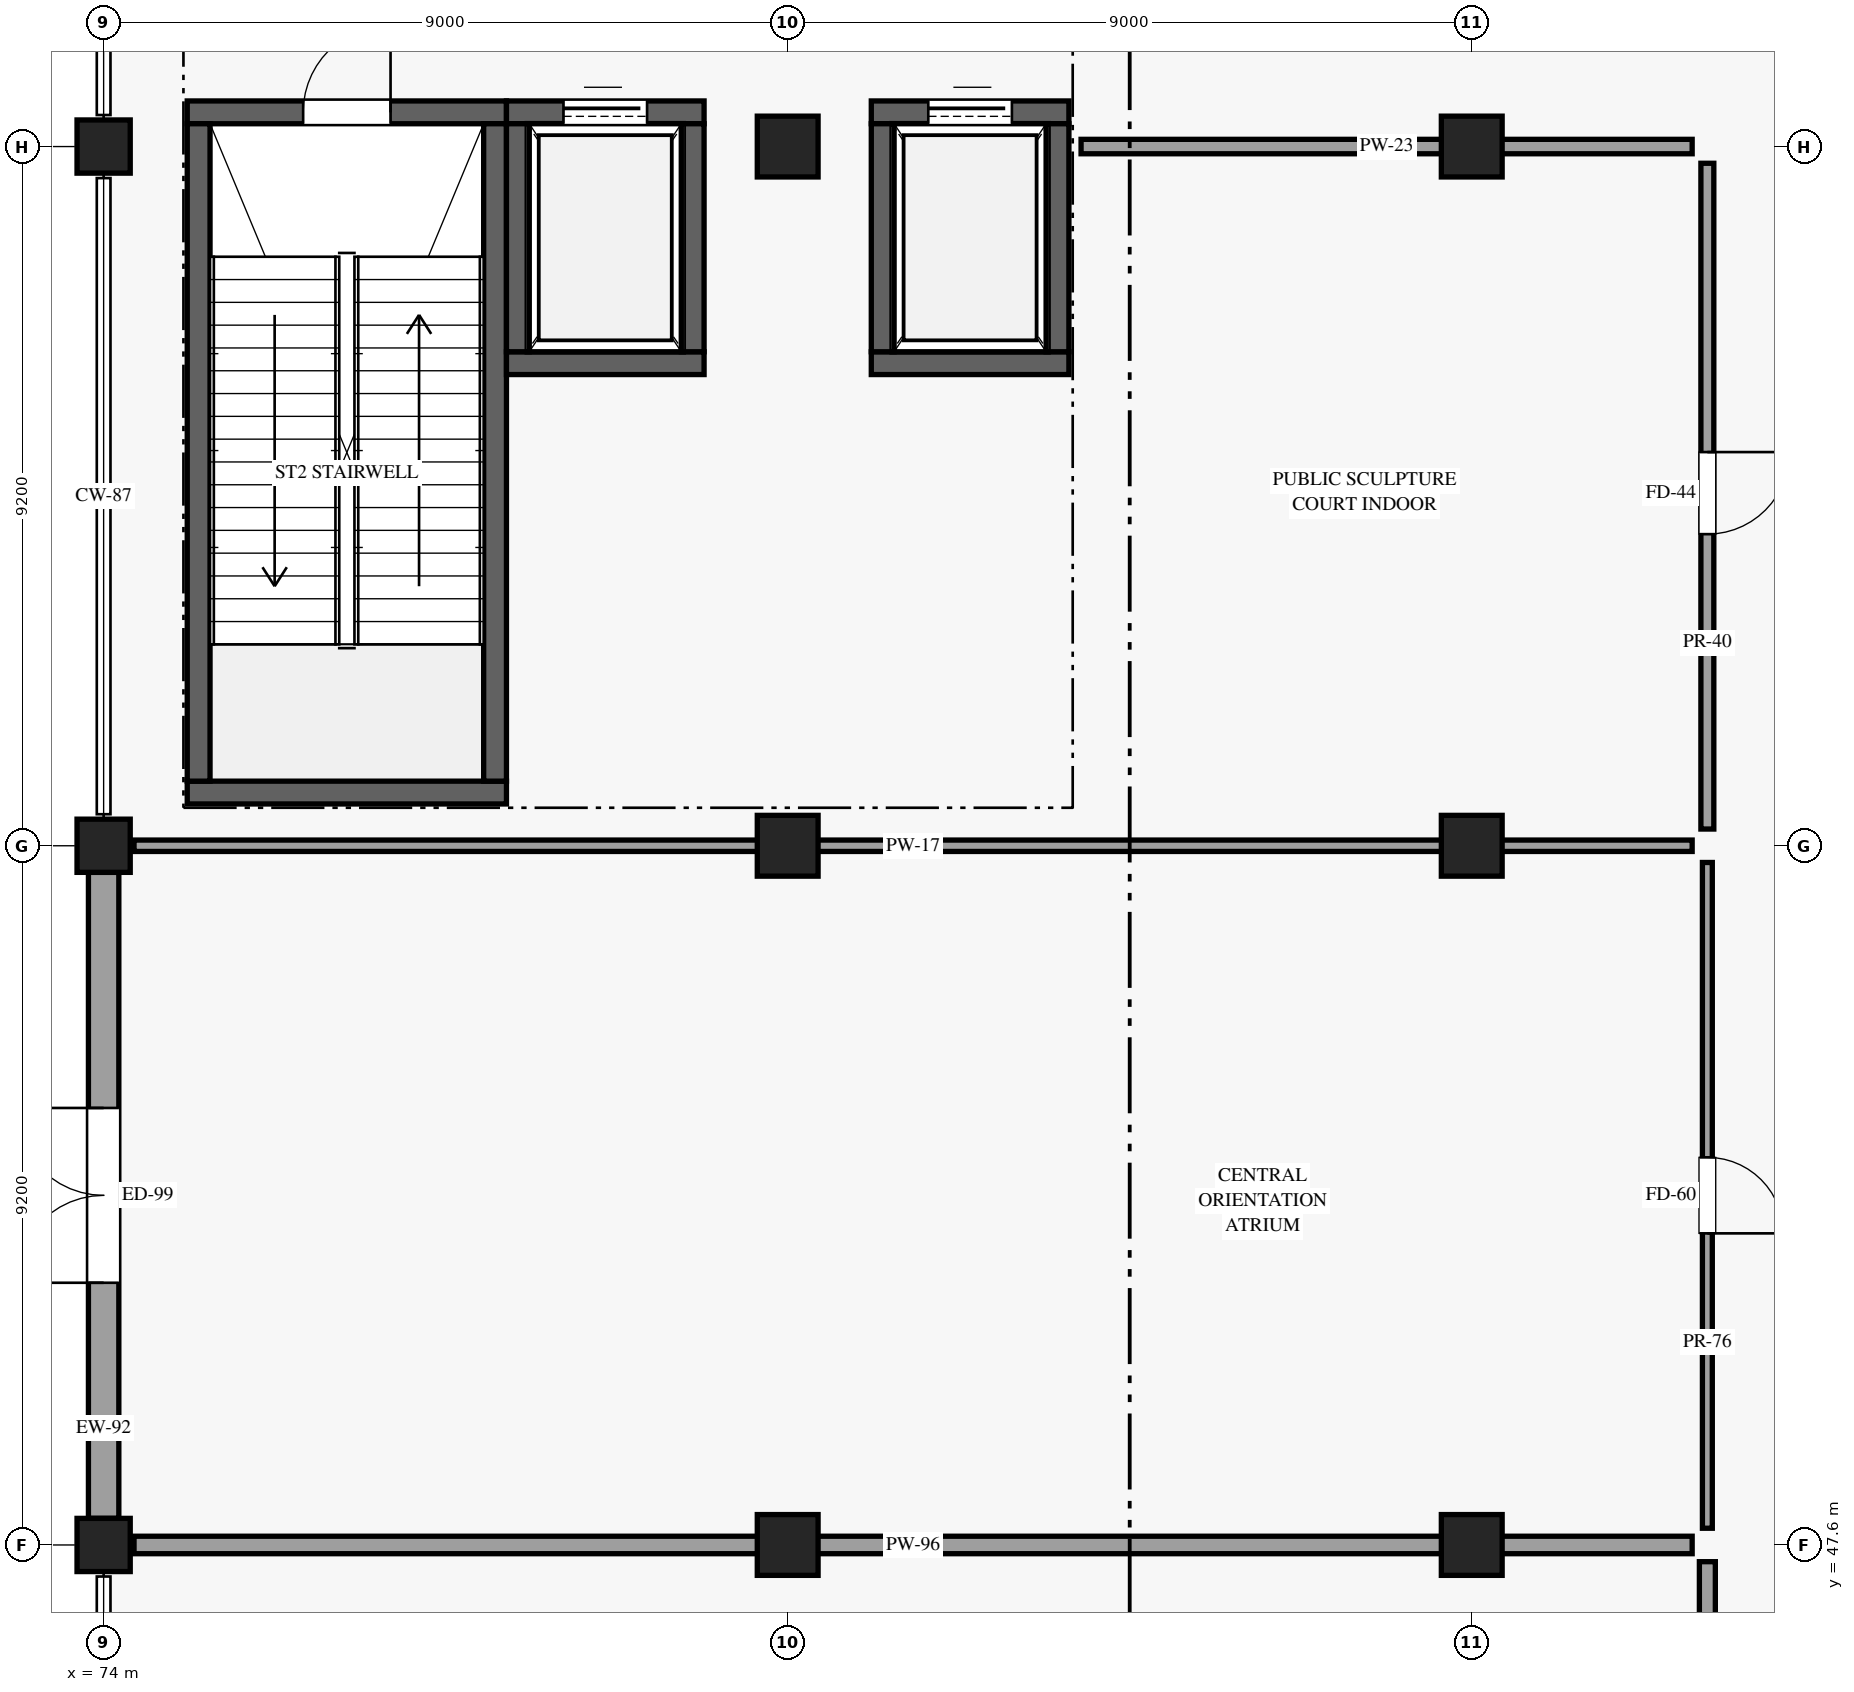
"""IFC4 building model, lengths in metres.
Left out: names, types, materials, properties, quantities, classifications, styles, units other than length and angle.
Written with IfcOpenShell. Run it as: python <this file> out.ifc"""

import sys

from ifc_helpers import new_model, si_unit, direction, frame, frame_2d, origin, origin_2d, place, context, subcontext, project, spatial, rectangle, circle, extrude, element, fill, save


model = new_model("IFC4")
c1 = context("Model", 3, precision=1e-05, world=origin(), true_north=direction((0.0, 1.0)))
c2 = subcontext(c1, "Body", "Model", "MODEL_VIEW")
j1 = project(units=[si_unit("LENGTHUNIT", "METRE"), si_unit("PLANEANGLEUNIT", "RADIAN")], contexts=[c1])
p1 = place(None, origin())
s1 = spatial("IfcSite", under=j1, at=p1, CompositionType="ELEMENT")
p2 = place(p1, origin())
s2 = spatial("IfcBuilding", under=s1, at=p2, CompositionType="ELEMENT")
p3 = place(p2, origin())
s3 = spatial("IfcBuildingStorey", under=s2, at=p3, CompositionType="ELEMENT", Elevation=0.0)
for number, where, z_axis, x_axis in (
    (1, (74.0, 47.6, 0.0), (0.0, 0.0, 1.0), (1.0, 0.0, 0.0)),
    (2, (74.0, 56.8, 0.0), (0.0, 0.0, 1.0), (1.0, 0.0, 0.0)),
    (3, (74.0, 66.0, 0.0), (0.0, 0.0, 1.0), (1.0, 0.0, 0.0)),
):
    element("IfcColumn", number, at=place(p3, frame(where, z_axis=z_axis, x_axis=x_axis)), inside=s3, PredefinedType="COLUMN", context=c2, shape_type="SweptSolid", body=[
        extrude(rectangle(XDim=0.7, YDim=0.7, at=origin_2d()), origin(), (0.0, 0.0, 1.0), 5.4),
    ])
for number, where, z_axis, x_axis in (
    (4, (83.0, 47.6, 0.0), (0.0, 0.0, 1.0), (1.0, 0.0, 0.0)),
    (5, (83.0, 56.8, 0.0), (0.0, 0.0, 1.0), (1.0, 0.0, 0.0)),
    (6, (83.0, 66.0, 0.0), (0.0, 0.0, 1.0), (1.0, 0.0, 0.0)),
    (7, (92.0, 47.6, 0.0), (0.0, 0.0, 1.0), (1.0, 0.0, 0.0)),
    (8, (92.0, 56.8, 0.0), (0.0, 0.0, 1.0), (1.0, 0.0, 0.0)),
    (9, (92.0, 66.0, 0.0), (0.0, 0.0, 1.0), (1.0, 0.0, 0.0)),
):
    element("IfcColumn", number, at=place(p3, frame(where, z_axis=z_axis, x_axis=x_axis)), inside=s3, PredefinedType="COLUMN", context=c2, shape_type="SweptSolid", body=[
        extrude(circle(Radius=0.4, at=origin_2d()), origin(), (0.0, 0.0, 1.0), 5.4),
    ])
p4 = place(p3, frame((74.0, 47.95, 0.0), z_axis=(0.0, 0.0, 1.0), x_axis=(0.0, 1.0, 0.0)))
e10 = element("IfcWall", 10, at=p4, inside=s3, PredefinedType="STANDARD", context=c2, shape_type="SweptSolid", body=[
    extrude(rectangle(XDim=8.5, YDim=0.4, at=frame_2d((4.25, 0.0))), origin(), (0.0, 0.0, 1.0), 4.195),
])
p5 = place(p4, frame((3.1, 0.0, 0.0)))
e11 = element("IfcOpeningElement", 11, at=p5, cuts=e10, PredefinedType="OPENING", context=c2, shape_type="SweptSolid", body=[
    extrude(rectangle(XDim=2.3, YDim=2.55, at=frame_2d((1.15, 1.275))), frame((0.0, 0.21, 0.0), z_axis=(0.0, -1.0, 0.0), x_axis=(1.0, 0.0, 0.0)), (0.0, 0.0, 1.0), 0.42),
])
p6 = place(p3, frame((75.1, 66.45, 0.0), z_axis=(0.0, 0.0, 1.0), x_axis=(1.0, 0.0, 0.0)))
e12 = element("IfcWall", 12, at=p6, inside=s3, PredefinedType="SHEAR", context=c2, shape_type="SweptSolid", body=[
    extrude(rectangle(XDim=4.2, YDim=0.3, at=frame_2d((2.1, 0.0))), origin(), (0.0, 0.0, 1.0), 5.12),
])
p7 = place(p6, frame((1.525, 0.0, 0.0)))
e13 = element("IfcOpeningElement", 13, at=p7, cuts=e12, PredefinedType="OPENING", context=c2, shape_type="SweptSolid", body=[
    extrude(rectangle(XDim=1.15, YDim=2.2, at=frame_2d((0.575, 1.1))), frame((0.0, 0.16, 0.0), z_axis=(0.0, -1.0, 0.0), x_axis=(1.0, 0.0, 0.0)), (0.0, 0.0, 1.0), 0.32),
])
p8 = place(p3, frame((75.1, 57.5, 0.0), z_axis=(0.0, 0.0, 1.0), x_axis=(1.0, 0.0, 0.0)))
e14 = element("IfcWall", 14, at=p8, inside=s3, PredefinedType="SHEAR", context=c2, shape_type="SweptSolid", body=[
    extrude(rectangle(XDim=4.2, YDim=0.3, at=frame_2d((2.1, 0.0))), origin(), (0.0, 0.0, 1.0), 5.12),
])
for number, where, z_axis, x_axis in (
    (15, (75.25, 57.65, 0.0), (0.0, 0.0, 1.0), (0.0, 1.0, 0.0)),
    (16, (79.15, 57.65, 0.0), (0.0, 0.0, 1.0), (0.0, 1.0, 0.0)),
):
    element("IfcWall", number, at=place(p3, frame(where, z_axis=z_axis, x_axis=x_axis)), inside=s3, PredefinedType="SHEAR", context=c2, shape_type="SweptSolid", body=[
        extrude(rectangle(XDim=8.65, YDim=0.3, at=frame_2d((4.325, 0.0))), origin(), (0.0, 0.0, 1.0), 5.12),
    ])
p9 = place(p3, frame((79.3, 66.45, 0.0), z_axis=(0.0, 0.0, 1.0), x_axis=(1.0, 0.0, 0.0)))
e17 = element("IfcWall", 17, at=p9, inside=s3, PredefinedType="SHEAR", context=c2, shape_type="SweptSolid", body=[
    extrude(rectangle(XDim=2.6, YDim=0.3, at=frame_2d((1.3, 0.0))), origin(), (0.0, 0.0, 1.0), 5.12),
])
p10 = place(p9, frame((0.75, 0.0, 0.0)))
e18 = element("IfcOpeningElement", 18, at=p10, cuts=e17, PredefinedType="OPENING", context=c2, shape_type="SweptSolid", body=[
    extrude(rectangle(XDim=1.1, YDim=2.2, at=frame_2d((0.55, 1.1))), frame((0.0, 0.16, 0.0), z_axis=(0.0, -1.0, 0.0), x_axis=(1.0, 0.0, 0.0)), (0.0, 0.0, 1.0), 0.32),
])
p11 = place(p3, frame((79.3, 63.15, 0.0), z_axis=(0.0, 0.0, 1.0), x_axis=(1.0, 0.0, 0.0)))
e19 = element("IfcWall", 19, at=p11, inside=s3, PredefinedType="SHEAR", context=c2, shape_type="SweptSolid", body=[
    extrude(rectangle(XDim=2.6, YDim=0.3, at=frame_2d((1.3, 0.0))), origin(), (0.0, 0.0, 1.0), 5.12),
])
for number, where, z_axis, x_axis in (
    (20, (81.75, 63.3, 0.0), (0.0, 0.0, 1.0), (0.0, 1.0, 0.0)),
    (21, (79.45, 63.3, 0.0), (0.0, 0.0, 1.0), (0.0, 1.0, 0.0)),
):
    element("IfcWall", number, at=place(p3, frame(where, z_axis=z_axis, x_axis=x_axis)), inside=s3, PredefinedType="SHEAR", context=c2, shape_type="SweptSolid", body=[
        extrude(rectangle(XDim=3.0, YDim=0.3, at=frame_2d((1.5, 0.0))), origin(), (0.0, 0.0, 1.0), 5.12),
    ])
p12 = place(p3, frame((84.1, 66.45, 0.0), z_axis=(0.0, 0.0, 1.0), x_axis=(1.0, 0.0, 0.0)))
e22 = element("IfcWall", 22, at=p12, inside=s3, PredefinedType="SHEAR", context=c2, shape_type="SweptSolid", body=[
    extrude(rectangle(XDim=2.6, YDim=0.3, at=frame_2d((1.3, 0.0))), origin(), (0.0, 0.0, 1.0), 5.12),
])
p13 = place(p12, frame((0.75, 0.0, 0.0)))
e23 = element("IfcOpeningElement", 23, at=p13, cuts=e22, PredefinedType="OPENING", context=c2, shape_type="SweptSolid", body=[
    extrude(rectangle(XDim=1.1, YDim=2.2, at=frame_2d((0.55, 1.1))), frame((0.0, 0.16, 0.0), z_axis=(0.0, -1.0, 0.0), x_axis=(1.0, 0.0, 0.0)), (0.0, 0.0, 1.0), 0.32),
])
p14 = place(p3, frame((84.1, 63.15, 0.0), z_axis=(0.0, 0.0, 1.0), x_axis=(1.0, 0.0, 0.0)))
e24 = element("IfcWall", 24, at=p14, inside=s3, PredefinedType="SHEAR", context=c2, shape_type="SweptSolid", body=[
    extrude(rectangle(XDim=2.6, YDim=0.3, at=frame_2d((1.3, 0.0))), origin(), (0.0, 0.0, 1.0), 5.12),
])
for number, where, z_axis, x_axis in (
    (25, (86.55, 63.3, 0.0), (0.0, 0.0, 1.0), (0.0, 1.0, 0.0)),
    (26, (84.25, 63.3, 0.0), (0.0, 0.0, 1.0), (0.0, 1.0, 0.0)),
):
    element("IfcWall", number, at=place(p3, frame(where, z_axis=z_axis, x_axis=x_axis)), inside=s3, PredefinedType="SHEAR", context=c2, shape_type="SweptSolid", body=[
        extrude(rectangle(XDim=3.0, YDim=0.3, at=frame_2d((1.5, 0.0))), origin(), (0.0, 0.0, 1.0), 5.12),
    ])
p15 = place(p3, frame((95.1, 38.94, 0.0), z_axis=(0.0, 0.0, 1.0), x_axis=(0.0, 1.0, 0.0)))
e27 = element("IfcWall", 27, at=p15, inside=s3, PredefinedType="PARTITIONING", context=c2, shape_type="SweptSolid", body=[
    extrude(rectangle(XDim=8.44, YDim=0.21, at=frame_2d((4.22, 0.0))), origin(), (0.0, 0.0, 1.0), 4.195),
])
p16 = place(p15, frame((4.828, 0.0, 0.0), z_axis=(0.0, 0.0, 1.0), x_axis=(-1.0, 0.0, 0.0)))
e28 = element("IfcOpeningElement", 28, at=p16, cuts=e27, PredefinedType="OPENING", context=c2, shape_type="SweptSolid", body=[
    extrude(rectangle(XDim=1.46, YDim=2.32, at=frame_2d((0.73, 1.16))), frame((0.0, 0.115, 0.0), z_axis=(0.0, -1.0, 0.0), x_axis=(1.0, 0.0, 0.0)), (0.0, 0.0, 1.0), 0.23),
])
p17 = place(p3, frame((74.4, 47.6, 0.0), z_axis=(0.0, 0.0, 1.0), x_axis=(1.0, 0.0, 0.0)))
e29 = element("IfcWall", 29, at=p17, inside=s3, PredefinedType="PARTITIONING", context=c2, shape_type="SweptSolid", body=[
    extrude(rectangle(XDim=20.5, YDim=0.23, at=frame_2d((10.25, 0.0))), origin(), (0.0, 0.0, 1.0), 4.195),
])
p18 = place(p3, frame((95.1, 47.82, 0.0), z_axis=(0.0, 0.0, 1.0), x_axis=(0.0, 1.0, 0.0)))
e30 = element("IfcWall", 30, at=p18, inside=s3, PredefinedType="PARTITIONING", context=c2, shape_type="SweptSolid", body=[
    extrude(rectangle(XDim=8.76, YDim=0.13, at=frame_2d((4.38, 0.0))), origin(), (0.0, 0.0, 1.0), 4.195),
])
p19 = place(p18, frame((4.88, 0.0, 0.0), z_axis=(0.0, 0.0, 1.0), x_axis=(-1.0, 0.0, 0.0)))
e31 = element("IfcOpeningElement", 31, at=p19, cuts=e30, PredefinedType="OPENING", context=c2, shape_type="SweptSolid", body=[
    extrude(rectangle(XDim=1.0, YDim=2.2, at=frame_2d((0.5, 1.1))), frame((0.0, 0.075, 0.0), z_axis=(0.0, -1.0, 0.0), x_axis=(1.0, 0.0, 0.0)), (0.0, 0.0, 1.0), 0.15),
])
p20 = place(p3, frame((74.4, 56.8, 0.0), z_axis=(0.0, 0.0, 1.0), x_axis=(1.0, 0.0, 0.0)))
e32 = element("IfcWall", 32, at=p20, inside=s3, PredefinedType="PARTITIONING", context=c2, shape_type="SweptSolid", body=[
    extrude(rectangle(XDim=20.5, YDim=0.15, at=frame_2d((10.25, 0.0))), origin(), (0.0, 0.0, 1.0), 4.195),
])
p21 = place(p3, frame((95.1, 57.02, 0.0), z_axis=(0.0, 0.0, 1.0), x_axis=(0.0, 1.0, 0.0)))
e33 = element("IfcWall", 33, at=p21, inside=s3, PredefinedType="PARTITIONING", context=c2, shape_type="SweptSolid", body=[
    extrude(rectangle(XDim=8.76, YDim=0.17, at=frame_2d((4.38, 0.0))), origin(), (0.0, 0.0, 1.0), 4.195),
])
p22 = place(p21, frame((4.96, 0.0, 0.0), z_axis=(0.0, 0.0, 1.0), x_axis=(-1.0, 0.0, 0.0)))
e34 = element("IfcOpeningElement", 34, at=p22, cuts=e33, PredefinedType="OPENING", context=c2, shape_type="SweptSolid", body=[
    extrude(rectangle(XDim=1.08, YDim=2.24, at=frame_2d((0.54, 1.12))), frame((0.0, 0.095, 0.0), z_axis=(0.0, -1.0, 0.0), x_axis=(1.0, 0.0, 0.0)), (0.0, 0.0, 1.0), 0.19),
])
p23 = place(p3, frame((86.86, 66.0, 0.0), z_axis=(0.0, 0.0, 1.0), x_axis=(1.0, 0.0, 0.0)))
e35 = element("IfcWall", 35, at=p23, inside=s3, PredefinedType="PARTITIONING", context=c2, shape_type="SweptSolid", body=[
    extrude(rectangle(XDim=8.04, YDim=0.19, at=frame_2d((4.02, 0.0))), origin(), (0.0, 0.0, 1.0), 3.795),
])
p24 = place(p5, origin())
e36 = element("IfcDoor", 36, at=p24, inside=s3, OperationType="DOUBLE_DOOR_SINGLE_SWING", PredefinedType="DOOR", context=c2, shape_type="SweptSolid", body=[
    extrude(rectangle(XDim=2.3, YDim=2.55, at=frame_2d((1.15, 1.275))), frame((0.0, 0.025, 0.0), z_axis=(0.0, -1.0, 0.0), x_axis=(1.0, 0.0, 0.0)), (0.0, 0.0, 1.0), 0.05),
])
fill(e11, e36)
p25 = place(p7, origin())
e37 = element("IfcDoor", 37, at=p25, inside=s3, OperationType="SINGLE_SWING_RIGHT", PredefinedType="DOOR", context=c2, shape_type="SweptSolid", body=[
    extrude(rectangle(XDim=1.15, YDim=2.2, at=frame_2d((0.575, 1.1))), frame((0.0, 0.025, 0.0), z_axis=(0.0, -1.0, 0.0), x_axis=(1.0, 0.0, 0.0)), (0.0, 0.0, 1.0), 0.05),
])
fill(e13, e37)
p26 = place(p10, origin())
e38 = element("IfcDoor", 38, at=p26, inside=s3, OperationType="SLIDING_TO_LEFT", PredefinedType="DOOR", context=c2, shape_type="SweptSolid", body=[
    extrude(rectangle(XDim=1.1, YDim=2.2, at=frame_2d((0.55, 1.1))), frame((0.0, 0.025, 0.0), z_axis=(0.0, -1.0, 0.0), x_axis=(1.0, 0.0, 0.0)), (0.0, 0.0, 1.0), 0.05),
])
fill(e18, e38)
p27 = place(p13, origin())
e39 = element("IfcDoor", 39, at=p27, inside=s3, OperationType="SLIDING_TO_RIGHT", PredefinedType="DOOR", context=c2, shape_type="SweptSolid", body=[
    extrude(rectangle(XDim=1.1, YDim=2.2, at=frame_2d((0.55, 1.1))), frame((0.0, 0.025, 0.0), z_axis=(0.0, -1.0, 0.0), x_axis=(1.0, 0.0, 0.0)), (0.0, 0.0, 1.0), 0.05),
])
fill(e23, e39)
p28 = place(p19, origin())
e40 = element("IfcDoor", 40, at=p28, inside=s3, OperationType="SINGLE_SWING_RIGHT", PredefinedType="DOOR", context=c2, shape_type="SweptSolid", body=[
    extrude(rectangle(XDim=1.0, YDim=2.2, at=frame_2d((0.5, 1.1))), frame((0.0, 0.025, 0.0), z_axis=(0.0, -1.0, 0.0), x_axis=(1.0, 0.0, 0.0)), (0.0, 0.0, 1.0), 0.05),
])
fill(e31, e40)
p29 = place(p22, origin())
e41 = element("IfcDoor", 41, at=p29, inside=s3, OperationType="SINGLE_SWING_LEFT", PredefinedType="DOOR", context=c2, shape_type="SweptSolid", body=[
    extrude(rectangle(XDim=1.08, YDim=2.24, at=frame_2d((0.54, 1.12))), frame((0.0, 0.025, 0.0), z_axis=(0.0, -1.0, 0.0), x_axis=(1.0, 0.0, 0.0)), (0.0, 0.0, 1.0), 0.05),
])
fill(e34, e41)
save(model, sys.argv[1])
